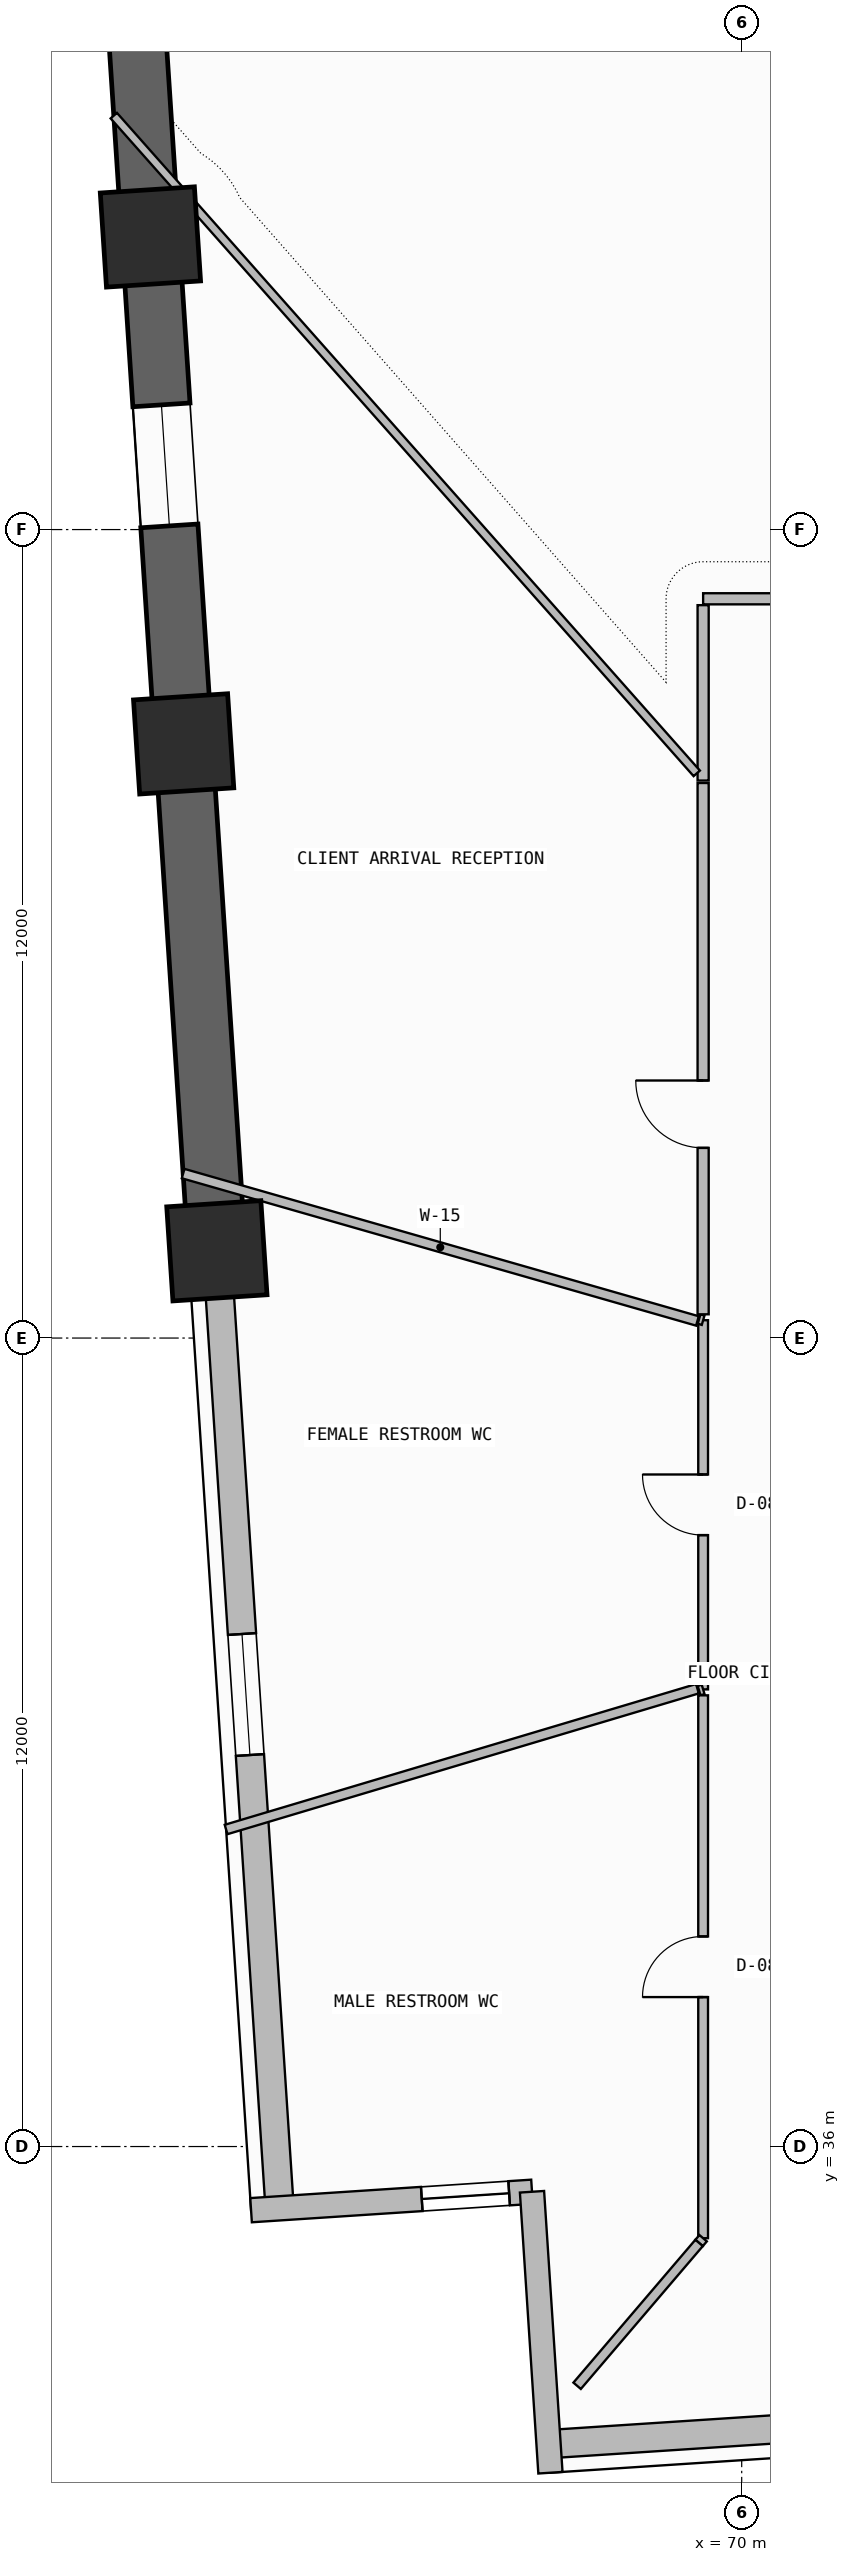
"""IFC4 building model, lengths in metres.
Left out: names, types, materials, properties, quantities, classifications, styles, units other than length and angle.
Written with IfcOpenShell. Run it as: python <this file> out.ifc"""

import sys

from ifc_helpers import new_model, si_unit, direction, frame, frame_2d, origin, origin_2d, place, context, subcontext, project, spatial, rectangle, extrude, element, fill, save


model = new_model("IFC4")
c1 = context("Model", 3, precision=1e-05, world=origin(), true_north=direction((0.0, 1.0)))
c2 = subcontext(c1, "Body", "Model", "MODEL_VIEW")
j1 = project(units=[si_unit("LENGTHUNIT", "METRE"), si_unit("PLANEANGLEUNIT", "RADIAN")], contexts=[c1])
p1 = place(None, origin())
s1 = spatial("IfcSite", under=j1, at=p1, CompositionType="ELEMENT")
p2 = place(p1, origin())
s2 = spatial("IfcBuilding", under=s1, at=p2, CompositionType="ELEMENT")
p3 = place(p2, frame((0.0, 0.0, 63.3)))
s3 = spatial("IfcBuildingStorey", under=s2, at=p3, CompositionType="ELEMENT", Elevation=63.3)
for number, where, z_axis, x_axis in (
    (1, (61.224, 64.343, -0.4), (0.0, 0.0, 1.0), (-0.065, 0.998, 0.0)),
    (2, (61.717, 56.819, -0.4), (0.0, 0.0, 1.0), (-0.065, 0.998, 0.0)),
):
    element("IfcColumn", number, at=place(p3, frame(where, z_axis=z_axis, x_axis=x_axis)), inside=s3, PredefinedType="COLUMN", context=c2, shape_type="SweptSolid", body=[
        extrude(rectangle(XDim=1.4, YDim=1.4, at=origin_2d()), origin(), (0.0, 0.0, 1.0), 4.0),
    ])
p4 = place(p3, frame((62.21, 49.295, 0.0), z_axis=(0.0, 0.0, 1.0), x_axis=(-0.06540312923, 0.997858923239, 0.0)))
e3 = element("IfcColumn", 3, at=p4, inside=s3, PredefinedType="COLUMN", context=c2, shape_type="SweptSolid", body=[
    extrude(rectangle(XDim=1.4, YDim=1.4, at=origin_2d()), origin(), (0.0, 0.0, 1.0), 3.6),
])
p5 = place(p3, frame((67.133, 31.583, 0.0), z_axis=(0.0, 0.0, 1.0), x_axis=(0.997859040617, 0.065401338356, 0.0)))
e4 = element("IfcWall", 4, at=p5, inside=s3, PredefinedType="SOLIDWALL", context=c2, shape_type="SweptSolid", body=[
    extrude(rectangle(XDim=17.862, YDim=0.42, at=frame_2d((8.931, 0.0))), origin(), (0.0, 0.0, 1.0), 2.325),
])
p6 = place(p5, frame((5.7, 0.0, 1.2)))
e5 = element("IfcOpeningElement", 5, at=p6, cuts=e4, PredefinedType="OPENING", context=c2, shape_type="SweptSolid", body=[
    extrude(rectangle(XDim=2.4, YDim=0.9, at=frame_2d((1.2, 0.45))), frame((0.0, 0.22, 0.0), z_axis=(0.0, -1.0, 0.0), x_axis=(1.0, 0.0, 0.0)), (0.0, 0.0, 1.0), 0.44),
])
p7 = place(p3, frame((60.785, 71.031, -0.4), z_axis=(0.0, 0.0, 1.0), x_axis=(0.065409824833, -0.997858484363, 0.0)))
e6 = element("IfcWall", 6, at=p7, inside=s3, PredefinedType="SHEAR", context=c2, shape_type="SweptSolid", body=[
    extrude(rectangle(XDim=21.783, YDim=0.85, at=frame_2d((10.891, 0.0))), origin(), (0.0, 0.0, 1.0), 3.74),
])
p8 = place(p7, frame((9.2, 0.0, 1.2)))
e7 = element("IfcOpeningElement", 7, at=p8, cuts=e6, PredefinedType="OPENING", context=c2, shape_type="SweptSolid", body=[
    extrude(rectangle(XDim=1.8, YDim=0.9, at=frame_2d((0.9, 0.45))), frame((0.0, 0.435, 0.0), z_axis=(0.0, -1.0, 0.0), x_axis=(1.0, 0.0, 0.0)), (0.0, 0.0, 1.0), 0.87),
])
p9 = place(p3, frame((62.21, 49.295, 0.0), z_axis=(0.0, 0.0, 1.0), x_axis=(0.065396027757, -0.997859388668, 0.0)))
e8 = element("IfcWall", 8, at=p9, inside=s3, PredefinedType="SOLIDWALL", context=c2, shape_type="SweptSolid", body=[
    extrude(rectangle(XDim=14.242, YDim=0.42, at=frame_2d((7.121, 0.0))), origin(), (0.0, 0.0, 1.0), 2.325),
])
p10 = place(p9, frame((5.7, 0.0, 1.2)))
e9 = element("IfcOpeningElement", 9, at=p10, cuts=e8, PredefinedType="OPENING", context=c2, shape_type="SweptSolid", body=[
    extrude(rectangle(XDim=1.8, YDim=0.9, at=frame_2d((0.9, 0.45))), frame((0.0, 0.22, 0.0), z_axis=(0.0, -1.0, 0.0), x_axis=(1.0, 0.0, 0.0)), (0.0, 0.0, 1.0), 0.44),
])
p11 = place(p3, frame((62.718, 35.055, 0.0), z_axis=(0.0, 0.0, 1.0), x_axis=(0.997860761953, 0.065375069826, 0.0)))
e10 = element("IfcWall", 10, at=p11, inside=s3, PredefinedType="SOLIDWALL", context=c2, shape_type="SweptSolid", body=[
    extrude(rectangle(XDim=4.179, YDim=0.36, at=frame_2d((2.089, 0.0))), origin(), (0.0, 0.0, 1.0), 3.34),
])
p12 = place(p11, frame((2.539, 0.0, 0.45)))
e11 = element("IfcOpeningElement", 11, at=p12, cuts=e10, PredefinedType="OPENING", context=c2, shape_type="SweptSolid", body=[
    extrude(rectangle(XDim=1.3, YDim=2.4, at=frame_2d((0.65, 1.2))), frame((0.0, 0.19, 0.0), z_axis=(0.0, -1.0, 0.0), x_axis=(1.0, 0.0, 0.0)), (0.0, 0.0, 1.0), 0.38),
])
p13 = place(p3, frame((66.887, 35.329, 0.0), z_axis=(0.0, 0.0, 1.0), x_axis=(0.065433242561, -0.99785694905, 0.0)))
e12 = element("IfcWall", 12, at=p13, inside=s3, PredefinedType="SOLIDWALL", context=c2, shape_type="SweptSolid", body=[
    extrude(rectangle(XDim=4.179, YDim=0.36, at=frame_2d((2.089, 0.0))), origin(), (0.0, 0.0, 1.0), 3.34),
])
p14 = place(p3, frame((84.682, 65.372, 0.0), z_axis=(0.0, 0.0, 1.0), x_axis=(-0.842418773655, 0.538823356763, 0.0)))
e13 = element("IfcWall", 13, at=p14, inside=s3, PredefinedType="PARAPET", context=c2, shape_type="SweptSolid", body=[
    extrude(rectangle(XDim=19.612, YDim=0.2, at=frame_2d((9.806, 0.0))), origin(), (0.0, 0.0, 1.0), 1.15),
])
p15 = place(p3, frame((69.427, 48.265, 0.0), z_axis=(0.0, 0.0, 1.0), x_axis=(0.0, -1.0, 0.0)))
e14 = element("IfcWall", 14, at=p15, inside=s3, PredefinedType="PARTITIONING", context=c2, shape_type="SweptSolid", body=[
    extrude(rectangle(XDim=5.479, YDim=0.145, at=frame_2d((2.74, 0.0))), origin(), (0.0, 0.0, 1.0), 3.34),
])
p16 = place(p15, frame((2.29, 0.0, 0.0)))
e15 = element("IfcOpeningElement", 15, at=p16, cuts=e14, PredefinedType="OPENING", context=c2, shape_type="SweptSolid", body=[
    extrude(rectangle(XDim=0.9, YDim=2.1, at=frame_2d((0.45, 1.05))), frame((0.0, 0.083, 0.0), z_axis=(0.0, -1.0, 0.0), x_axis=(1.0, 0.0, 0.0)), (0.0, 0.0, 1.0), 0.165),
])
p17 = place(p3, frame((69.427, 42.785, 0.0), z_axis=(0.0, 0.0, 1.0), x_axis=(-0.957611740153, -0.288062068176, 0.0)))
e16 = element("IfcWall", 16, at=p17, inside=s3, PredefinedType="PARTITIONING", context=c2, shape_type="SweptSolid", body=[
    extrude(rectangle(XDim=0.063, YDim=0.145, at=frame_2d((0.031, 0.0))), origin(), (0.0, 0.0, 1.0), 3.34),
])
p18 = place(p3, frame((69.367, 48.282, 0.0), z_axis=(0.0, 0.0, 1.0), x_axis=(0.961818474576, -0.273688183822, 0.0)))
e17 = element("IfcWall", 17, at=p18, inside=s3, PredefinedType="PARTITIONING", context=c2, shape_type="SweptSolid", body=[
    extrude(rectangle(XDim=0.062, YDim=0.145, at=frame_2d((0.031, 0.0))), origin(), (0.0, 0.0, 1.0), 3.34),
])
p19 = place(p3, frame((69.343, 42.795, 0.0), z_axis=(0.0, 0.0, 1.0), x_axis=(-0.958189050694, -0.286135882282, 0.0)))
e18 = element("IfcWall", 18, at=p19, inside=s3, PredefinedType="PARTITIONING", context=c2, shape_type="SweptSolid", body=[
    extrude(rectangle(XDim=7.301, YDim=0.145, at=frame_2d((3.65, 0.0))), origin(), (0.0, 0.0, 1.0), 3.34),
])
p20 = place(p3, frame((61.709, 50.441, 0.0), z_axis=(0.0, 0.0, 1.0), x_axis=(0.961320661505, -0.275431635371, 0.0)))
e19 = element("IfcWall", 19, at=p20, inside=s3, PredefinedType="PARTITIONING", context=c2, shape_type="SweptSolid", body=[
    extrude(rectangle(XDim=7.941, YDim=0.145, at=frame_2d((3.971, 0.0))), origin(), (0.0, 0.0, 1.0), 2.325),
])
p21 = place(p3, frame((69.427, 42.697, 0.0), z_axis=(0.0, 0.0, 1.0), x_axis=(0.0, -1.0, 0.0)))
e20 = element("IfcWall", 20, at=p21, inside=s3, PredefinedType="PARTITIONING", context=c2, shape_type="SweptSolid", body=[
    extrude(rectangle(XDim=8.058, YDim=0.145, at=frame_2d((4.029, 0.0))), origin(), (0.0, 0.0, 1.0), 3.34),
])
p22 = place(p21, frame((3.579, 0.0, 0.0)))
e21 = element("IfcOpeningElement", 21, at=p22, cuts=e20, PredefinedType="OPENING", context=c2, shape_type="SweptSolid", body=[
    extrude(rectangle(XDim=0.9, YDim=2.1, at=frame_2d((0.45, 1.05))), frame((0.0, 0.083, 0.0), z_axis=(0.0, -1.0, 0.0), x_axis=(1.0, 0.0, 0.0)), (0.0, 0.0, 1.0), 0.165),
])
p23 = place(p3, frame((69.427, 34.639, 0.0), z_axis=(0.0, 0.0, 1.0), x_axis=(-0.649485850124, -0.760373678193, 0.0)))
e22 = element("IfcWall", 22, at=p23, inside=s3, PredefinedType="PARTITIONING", context=c2, shape_type="SweptSolid", body=[
    extrude(rectangle(XDim=0.093, YDim=0.145, at=frame_2d((0.046, 0.0))), origin(), (0.0, 0.0, 1.0), 3.34),
])
p24 = place(p3, frame((76.764, 58.972, 0.0), z_axis=(0.0, 0.0, 1.0), x_axis=(-1.0, 0.0, 0.0)))
e23 = element("IfcWall", 23, at=p24, inside=s3, PredefinedType="PARTITIONING", context=c2, shape_type="SweptSolid", body=[
    extrude(rectangle(XDim=7.337, YDim=0.165, at=frame_2d((3.668, 0.0))), origin(), (0.0, 0.0, 1.0), 2.725),
])
p25 = place(p24, frame((1.506, 0.0, 0.0)))
e24 = element("IfcOpeningElement", 24, at=p25, cuts=e23, PredefinedType="OPENING", context=c2, shape_type="SweptSolid", body=[
    extrude(rectangle(XDim=1.0, YDim=2.2, at=frame_2d((0.5, 1.1))), frame((0.0, 0.093, 0.0), z_axis=(0.0, -1.0, 0.0), x_axis=(1.0, 0.0, 0.0)), (0.0, 0.0, 1.0), 0.185),
])
p26 = place(p3, frame((69.427, 58.878, 0.0), z_axis=(0.0, 0.0, 1.0), x_axis=(0.0, -1.0, 0.0)))
e25 = element("IfcWall", 25, at=p26, inside=s3, PredefinedType="PARTITIONING", context=c2, shape_type="SweptSolid", body=[
    extrude(rectangle(XDim=2.603, YDim=0.165, at=frame_2d((1.302, 0.0))), origin(), (0.0, 0.0, 1.0), 2.725),
])
p27 = place(p3, frame((69.333, 56.381, 0.0), z_axis=(0.0, 0.0, 1.0), x_axis=(-0.663307276118, 0.748347150358, 0.0)))
e26 = element("IfcWall", 26, at=p27, inside=s3, PredefinedType="PARTITIONING", context=c2, shape_type="SweptSolid", body=[
    extrude(rectangle(XDim=13.045, YDim=0.125, at=frame_2d((6.523, 0.0))), origin(), (0.0, 0.0, 1.0), 2.725),
])
p28 = place(p3, frame((69.427, 56.238, 0.0), z_axis=(0.0, 0.0, 1.0), x_axis=(0.0, -1.0, 0.0)))
e27 = element("IfcWall", 27, at=p28, inside=s3, PredefinedType="PARTITIONING", context=c2, shape_type="SweptSolid", body=[
    extrude(rectangle(XDim=7.886, YDim=0.165, at=frame_2d((3.943, 0.0))), origin(), (0.0, 0.0, 1.0), 2.725),
])
p29 = place(p28, frame((4.416, 0.0, 0.0)))
e28 = element("IfcOpeningElement", 28, at=p29, cuts=e27, PredefinedType="OPENING", context=c2, shape_type="SweptSolid", body=[
    extrude(rectangle(XDim=1.0, YDim=2.2, at=frame_2d((0.5, 1.1))), frame((0.0, 0.093, 0.0), z_axis=(0.0, -1.0, 0.0), x_axis=(1.0, 0.0, 0.0)), (0.0, 0.0, 1.0), 0.185),
])
p30 = place(p3, frame((69.367, 34.569, 0.0), z_axis=(0.0, 0.0, 1.0), x_axis=(-0.649261144393, -0.760565556926, 0.0)))
e29 = element("IfcWall", 29, at=p30, inside=s3, PredefinedType="PARTITIONING", context=c2, shape_type="SweptSolid", body=[
    extrude(rectangle(XDim=2.788, YDim=0.145, at=frame_2d((1.394, 0.0))), origin(), (0.0, 0.0, 1.0), 3.34),
])
p31 = place(p8, origin())
e30 = element("IfcWindow", 30, at=p31, inside=s3, PartitioningType="SINGLE_PANEL", PredefinedType="WINDOW", context=c2, shape_type="SweptSolid", body=[
    extrude(rectangle(XDim=1.8, YDim=0.9, at=frame_2d((0.9, 0.45))), frame((0.0, 0.03, 0.0), z_axis=(0.0, -1.0, 0.0), x_axis=(1.0, 0.0, 0.0)), (0.0, 0.0, 1.0), 0.06),
])
fill(e7, e30)
p32 = place(p10, origin())
e31 = element("IfcWindow", 31, at=p32, inside=s3, PartitioningType="SINGLE_PANEL", PredefinedType="WINDOW", context=c2, shape_type="SweptSolid", body=[
    extrude(rectangle(XDim=1.8, YDim=0.9, at=frame_2d((0.9, 0.45))), frame((0.0, 0.03, 0.0), z_axis=(0.0, -1.0, 0.0), x_axis=(1.0, 0.0, 0.0)), (0.0, 0.0, 1.0), 0.06),
])
fill(e9, e31)
p33 = place(p12, origin())
e32 = element("IfcWindow", 32, at=p33, inside=s3, PartitioningType="SINGLE_PANEL", PredefinedType="WINDOW", context=c2, shape_type="SweptSolid", body=[
    extrude(rectangle(XDim=1.3, YDim=2.4, at=frame_2d((0.65, 1.2))), frame((0.0, 0.03, 0.0), z_axis=(0.0, -1.0, 0.0), x_axis=(1.0, 0.0, 0.0)), (0.0, 0.0, 1.0), 0.06),
])
fill(e11, e32)
p34 = place(p16, frame((0.9, 0.0, 0.0), z_axis=(0.0, 0.0, 1.0), x_axis=(-1.0, 0.0, 0.0)))
e33 = element("IfcDoor", 33, at=p34, inside=s3, OperationType="SINGLE_SWING_RIGHT", PredefinedType="DOOR", context=c2, shape_type="SweptSolid", body=[
    extrude(rectangle(XDim=0.9, YDim=2.1, at=frame_2d((0.45, 1.05))), frame((0.0, 0.025, 0.0), z_axis=(0.0, -1.0, 0.0), x_axis=(1.0, 0.0, 0.0)), (0.0, 0.0, 1.0), 0.05),
])
fill(e15, e33)
p35 = place(p22, frame((0.9, 0.0, 0.0), z_axis=(0.0, 0.0, 1.0), x_axis=(-1.0, 0.0, 0.0)))
e34 = element("IfcDoor", 34, at=p35, inside=s3, OperationType="SINGLE_SWING_LEFT", PredefinedType="DOOR", context=c2, shape_type="SweptSolid", body=[
    extrude(rectangle(XDim=0.9, YDim=2.1, at=frame_2d((0.45, 1.05))), frame((0.0, 0.025, 0.0), z_axis=(0.0, -1.0, 0.0), x_axis=(1.0, 0.0, 0.0)), (0.0, 0.0, 1.0), 0.05),
])
fill(e21, e34)
p36 = place(p29, frame((1.0, 0.0, 0.0), z_axis=(0.0, 0.0, 1.0), x_axis=(-1.0, 0.0, 0.0)))
e35 = element("IfcDoor", 35, at=p36, inside=s3, OperationType="SINGLE_SWING_RIGHT", PredefinedType="DOOR", context=c2, shape_type="SweptSolid", body=[
    extrude(rectangle(XDim=1.0, YDim=2.2, at=frame_2d((0.5, 1.1))), frame((0.0, 0.025, 0.0), z_axis=(0.0, -1.0, 0.0), x_axis=(1.0, 0.0, 0.0)), (0.0, 0.0, 1.0), 0.05),
])
fill(e28, e35)
save(model, sys.argv[1])
